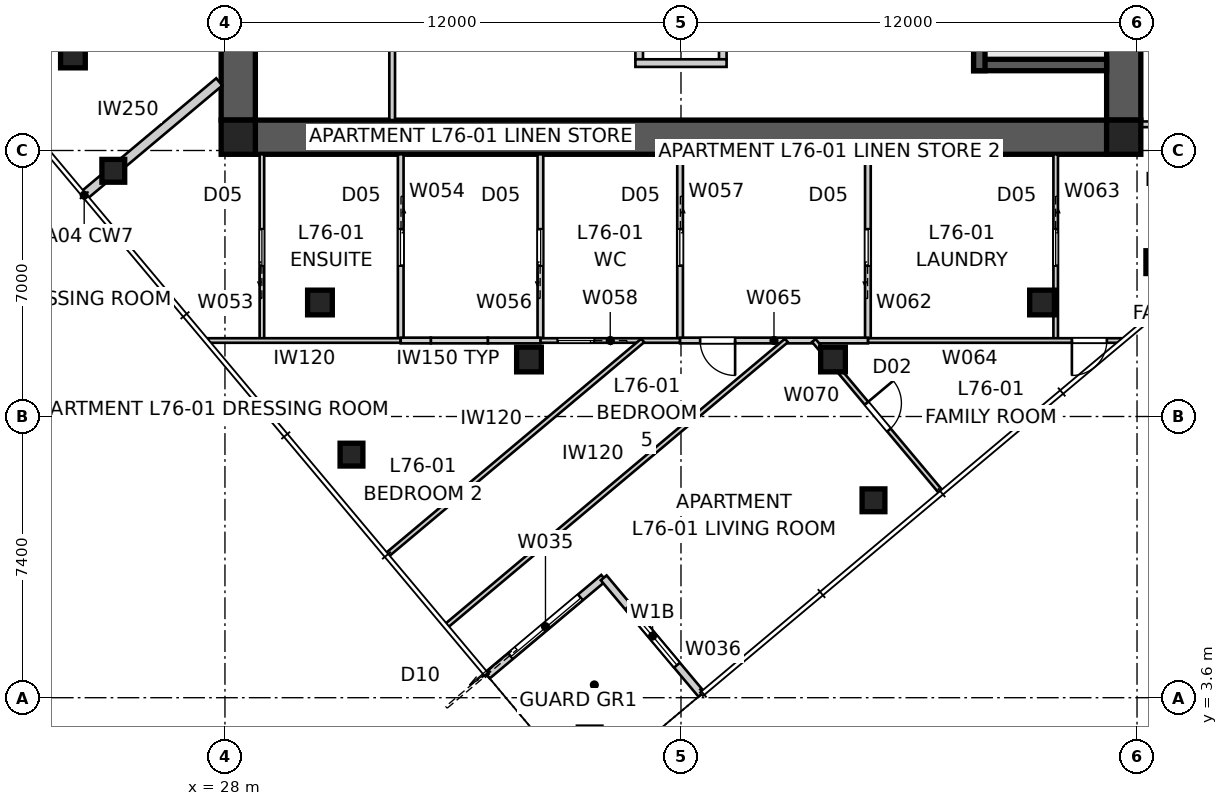
"""IFC4 building model, lengths in metres.
Left out: names, types, materials, properties, quantities, classifications, styles, units other than length and angle.
Written with IfcOpenShell. Run it as: python <this file> out.ifc"""

import sys

from ifc_helpers import new_model, si_unit, direction, frame, frame_2d, origin, origin_2d, place, context, subcontext, project, spatial, polyline, rectangle, outline, extrude, element, fill, save


model = new_model("IFC4")
c1 = context("Model", 3, precision=1e-05, world=origin(), true_north=direction((0.0, 1.0)))
c2 = subcontext(c1, "Body", "Model", "MODEL_VIEW")
j1 = project(units=[si_unit("LENGTHUNIT", "METRE"), si_unit("PLANEANGLEUNIT", "RADIAN")], contexts=[c1])
p1 = place(None, origin())
s1 = spatial("IfcSite", under=j1, at=p1, CompositionType="ELEMENT")
p2 = place(p1, origin())
s2 = spatial("IfcBuilding", under=s1, at=p2, CompositionType="ELEMENT")
p3 = place(p2, frame((0.0, 0.0, 276.0)))
s3 = spatial("IfcBuildingStorey", under=s2, at=p3, CompositionType="ELEMENT", Elevation=276.0)
p4 = place(p3, frame((51.2, 18.35, 0.0), z_axis=(0.0, 0.0, 1.0), x_axis=(-1.0, 0.0, 0.0)))
e1 = element("IfcWall", 1, at=p4, inside=s3, PredefinedType="SHEAR", context=c2, shape_type="SweptSolid", body=[
    extrude(outline(polyline([(0.0, -0.45), (22.4, -0.45), (22.4, -0.025), (22.85, -0.025), (22.85, 0.025), (22.4, 0.025), (22.4, 0.45), (0.0, 0.45), (0.0, 0.025), (-0.45, 0.025), (-0.45, -0.025), (0.0, -0.025), (0.0, -0.45)])), origin(), (0.0, 0.0, 1.0), 3.4),
])
p5 = place(p3, frame((51.65, 18.8, 0.0), z_axis=(0.0, 0.0, 1.0), x_axis=(0.0, 1.0, 0.0)))
e2 = element("IfcWall", 2, at=p5, inside=s3, PredefinedType="SHEAR", context=c2, shape_type="SweptSolid", body=[
    extrude(outline(polyline([(0.0, -0.45), (22.4, -0.45), (22.4, -0.025), (22.85, -0.025), (22.85, 0.025), (22.4, 0.025), (22.4, 0.45), (0.0, 0.45), (0.0, 0.025), (-0.45, 0.025), (-0.45, -0.025), (0.0, -0.025), (0.0, -0.45)])), origin(), (0.0, 0.0, 1.0), 3.4),
])
p6 = place(p5, frame((11.14, 0.0, 0.0)))
e3 = element("IfcOpeningElement", 3, at=p6, cuts=e2, PredefinedType="OPENING", context=c2, shape_type="SweptSolid", body=[
    extrude(rectangle(XDim=1.02, YDim=2.4, at=frame_2d((0.51, 1.2))), frame((0.0, 0.46, 0.0), z_axis=(0.0, -1.0, 0.0), x_axis=(1.0, 0.0, 0.0)), (0.0, 0.0, 1.0), 0.92),
])
p7 = place(p3, frame((28.35, 41.2, 0.0), z_axis=(0.0, 0.0, 1.0), x_axis=(0.0, -1.0, 0.0)))
e4 = element("IfcWall", 4, at=p7, inside=s3, PredefinedType="SHEAR", context=c2, shape_type="SweptSolid", body=[
    extrude(outline(polyline([(0.0, -0.45), (22.4, -0.45), (22.4, -0.025), (22.85, -0.025), (22.85, 0.025), (22.4, 0.025), (22.4, 0.45), (0.0, 0.45), (0.0, 0.025), (-0.45, 0.025), (-0.45, -0.025), (0.0, -0.025), (0.0, -0.45)])), origin(), (0.0, 0.0, 1.0), 3.4),
])
p8 = place(p7, frame((11.14, 0.0, 0.0)))
e5 = element("IfcOpeningElement", 5, at=p8, cuts=e4, PredefinedType="OPENING", context=c2, shape_type="SweptSolid", body=[
    extrude(rectangle(XDim=1.02, YDim=2.4, at=frame_2d((0.51, 1.2))), frame((0.0, 0.46, 0.0), z_axis=(0.0, -1.0, 0.0), x_axis=(1.0, 0.0, 0.0)), (0.0, 0.0, 1.0), 0.92),
])
p9 = place(p3, frame((47.85, 27.8, 0.0), z_axis=(0.0, 0.0, 1.0), x_axis=(0.0, -1.0, 0.0)))
e6 = element("IfcWall", 6, at=p9, inside=s3, PredefinedType="SHEAR", context=c2, shape_type="SweptSolid", body=[
    extrude(rectangle(XDim=7.7, YDim=0.3, at=frame_2d((3.85, 0.0))), origin(), (0.0, 0.0, 1.0), 3.4),
])
p10 = place(p3, frame((51.2, 20.25, 0.0), z_axis=(0.0, 0.0, 1.0), x_axis=(-1.0, 0.0, 0.0)))
e7 = element("IfcWall", 7, at=p10, inside=s3, PredefinedType="SHEAR", context=c2, shape_type="SweptSolid", body=[
    extrude(rectangle(XDim=3.5, YDim=0.3, at=frame_2d((1.75, 0.0))), origin(), (0.0, 0.0, 1.0), 3.4),
])
for number, where, z_axis, x_axis in (
    (8, (38.9, 22.4, 0.0), (0.0, 0.0, 1.0), (0.0, -1.0, 0.0)),
    (9, (41.1, 22.4, 0.0), (0.0, 0.0, 1.0), (0.0, -1.0, 0.0)),
):
    element("IfcWall", number, at=place(p3, frame(where, z_axis=z_axis, x_axis=x_axis)), inside=s3, PredefinedType="SOLIDWALL", context=c2, shape_type="SweptSolid", body=[
        extrude(rectangle(XDim=2.0, YDim=0.2, at=frame_2d((1.0, 0.0))), origin(), (0.0, 0.0, 1.0), 3.4),
    ])
p11 = place(p3, frame((38.8, 20.3, 0.0), z_axis=(0.0, 0.0, 1.0), x_axis=(1.0, 0.0, 0.0)))
e10 = element("IfcWall", 10, at=p11, inside=s3, PredefinedType="SOLIDWALL", context=c2, shape_type="SweptSolid", body=[
    extrude(rectangle(XDim=2.4, YDim=0.2, at=frame_2d((1.2, 0.0))), origin(), (0.0, 0.0, 1.0), 3.4),
])
for number, where, z_axis, x_axis in (
    (11, (28.35, 18.35, 0.0), (0.0, 0.0, 1.0), (1.0, 0.0, 0.0)),
    (12, (51.65, 18.35, 0.0), (0.0, 0.0, 1.0), (1.0, 0.0, 0.0)),
):
    element("IfcColumn", number, at=place(p3, frame(where, z_axis=z_axis, x_axis=x_axis)), inside=s3, PredefinedType="COLUMN", context=c2, shape_type="SweptSolid", body=[
        extrude(rectangle(XDim=0.9, YDim=0.9, at=origin_2d()), origin(), (0.0, 0.0, 1.0), 3.4),
    ])
for number, where, z_axis, x_axis in (
    (13, (45.065, 8.795, 0.0), (0.0, 0.0, 1.0), (1.0, 0.0, 0.0)),
    (14, (52.534, 15.062, 0.0), (0.0, 0.0, 1.0), (1.0, 0.0, 0.0)),
    (15, (25.062, 17.466, 0.0), (0.0, 0.0, 1.0), (1.0, 0.0, 0.0)),
    (16, (31.329, 9.997, 0.0), (0.0, 0.0, 1.0), (1.0, 0.0, 0.0)),
):
    element("IfcColumn", number, at=place(p3, frame(where, z_axis=z_axis, x_axis=x_axis)), inside=s3, PredefinedType="COLUMN", context=c2, shape_type="SweptSolid", body=[
        extrude(rectangle(XDim=0.6, YDim=0.6, at=origin_2d()), origin(), (0.0, 0.0, 1.0), 3.4),
    ])
for number, where, z_axis, x_axis in (
    (17, (24.0, 20.5, 0.0), (0.0, 0.0, 1.0), (1.0, 0.0, 0.0)),
    (18, (30.5, 14.0, 0.0), (0.0, 0.0, 1.0), (1.0, 0.0, 0.0)),
    (19, (36.0, 12.5, 0.0), (0.0, 0.0, 1.0), (1.0, 0.0, 0.0)),
    (20, (44.0, 12.5, 0.0), (0.0, 0.0, 1.0), (1.0, 0.0, 0.0)),
    (21, (49.5, 14.0, 0.0), (0.0, 0.0, 1.0), (1.0, 0.0, 0.0)),
):
    element("IfcColumn", number, at=place(p3, frame(where, z_axis=z_axis, x_axis=x_axis)), inside=s3, PredefinedType="COLUMN", context=c2, shape_type="SweptSolid", body=[
        extrude(rectangle(XDim=0.65, YDim=0.65, at=origin_2d()), origin(), (0.0, 0.0, 1.0), 3.4),
    ])
p12 = place(p3, frame((34.902, 4.183, 0.0), z_axis=(0.0, 0.0, 1.0), x_axis=(0.766060656284, 0.642768287094, 0.0)))
e22 = element("IfcWall", 22, at=p12, inside=s3, PredefinedType="SOLIDWALL", context=c2, shape_type="SweptSolid", body=[
    extrude(rectangle(XDim=4.0, YDim=0.2, at=frame_2d((2.0, 0.0))), origin(), (0.0, 0.0, 1.0), 3.25),
])
p13 = place(p12, frame((0.8, 0.0, 0.0)))
e23 = element("IfcOpeningElement", 23, at=p13, cuts=e22, PredefinedType="OPENING", context=c2, shape_type="SweptSolid", body=[
    extrude(rectangle(XDim=2.4, YDim=2.4, at=frame_2d((1.2, 1.2))), frame((0.0, 0.11, 0.0), z_axis=(0.0, -1.0, 0.0), x_axis=(1.0, 0.0, 0.0)), (0.0, 0.0, 1.0), 0.22),
])
p14 = place(p3, frame((37.966, 6.754, 0.0), z_axis=(0.0, 0.0, 1.0), x_axis=(0.642798342015, -0.766035437498, 0.0)))
e24 = element("IfcWall", 24, at=p14, inside=s3, PredefinedType="SOLIDWALL", context=c2, shape_type="SweptSolid", body=[
    extrude(rectangle(XDim=4.0, YDim=0.2, at=frame_2d((2.0, 0.0))), origin(), (0.0, 0.0, 1.0), 3.25),
])
p15 = place(p14, frame((1.0, 0.0, 0.45)))
e25 = element("IfcOpeningElement", 25, at=p15, cuts=e24, PredefinedType="OPENING", context=c2, shape_type="SweptSolid", body=[
    extrude(rectangle(XDim=2.0, YDim=1.8, at=frame_2d((1.0, 0.9))), frame((0.0, 0.11, 0.0), z_axis=(0.0, -1.0, 0.0), x_axis=(1.0, 0.0, 0.0)), (0.0, 0.0, 1.0), 0.22),
])
p16 = place(p3, frame((24.296, 16.823, 0.0), z_axis=(0.0, 0.0, 1.0), x_axis=(0.76603440109, 0.64279957712, 0.0)))
e26 = element("IfcWall", 26, at=p16, inside=s3, PredefinedType="PARTITIONING", context=c2, shape_type="SweptSolid", body=[
    extrude(rectangle(XDim=4.64, YDim=0.25, at=frame_2d((2.32, 0.0))), origin(), (0.0, 0.0, 1.0), 3.25),
])
p17 = place(p3, frame((32.4, 18.8, 0.0), z_axis=(0.0, 0.0, 1.0), x_axis=(0.0, 1.0, 0.0)))
e27 = element("IfcWall", 27, at=p17, inside=s3, PredefinedType="SOLIDWALL", context=c2, shape_type="SweptSolid", body=[
    extrude(rectangle(XDim=5.9, YDim=0.15, at=frame_2d((2.95, 0.0))), origin(), (0.0, 0.0, 1.0), 3.25),
])
p18 = place(p3, frame((28.972, 13.0, 0.0), z_axis=(0.0, 0.0, 1.0), x_axis=(0.0, 1.0, 0.0)))
e28 = element("IfcWall", 28, at=p18, inside=s3, PredefinedType="PARTITIONING", context=c2, shape_type="SweptSolid", body=[
    extrude(rectangle(XDim=4.9, YDim=0.12, at=frame_2d((2.45, 0.0))), origin(), (0.0, 0.0, 1.0), 3.25),
])
p19 = place(p18, frame((1.97, 0.0, 0.0)))
e29 = element("IfcOpeningElement", 29, at=p19, cuts=e28, PredefinedType="OPENING", context=c2, shape_type="SweptSolid", body=[
    extrude(rectangle(XDim=0.96, YDim=2.1, at=frame_2d((0.48, 1.05))), frame((0.0, 0.07, 0.0), z_axis=(0.0, -1.0, 0.0), x_axis=(1.0, 0.0, 0.0)), (0.0, 0.0, 1.0), 0.14),
])
p20 = place(p3, frame((32.625, 17.9, 0.0), z_axis=(0.0, 0.0, 1.0), x_axis=(0.0, -1.0, 0.0)))
e30 = element("IfcWall", 30, at=p20, inside=s3, PredefinedType="SOLIDWALL", context=c2, shape_type="SweptSolid", body=[
    extrude(rectangle(XDim=4.9, YDim=0.15, at=frame_2d((2.45, 0.0))), origin(), (0.0, 0.0, 1.0), 3.25),
])
p21 = place(p20, frame((1.97, 0.0, 0.0)))
e31 = element("IfcOpeningElement", 31, at=p21, cuts=e30, PredefinedType="OPENING", context=c2, shape_type="SweptSolid", body=[
    extrude(rectangle(XDim=0.96, YDim=2.1, at=frame_2d((0.48, 1.05))), frame((0.0, 0.085, 0.0), z_axis=(0.0, -1.0, 0.0), x_axis=(1.0, 0.0, 0.0)), (0.0, 0.0, 1.0), 0.17),
])
p22 = place(p3, frame((32.625, 13.0, 0.0), z_axis=(0.0, 0.0, 1.0), x_axis=(-1.0, 0.0, 0.0)))
e32 = element("IfcWall", 32, at=p22, inside=s3, PredefinedType="PARTITIONING", context=c2, shape_type="SweptSolid", body=[
    extrude(rectangle(XDim=5.069, YDim=0.12, at=frame_2d((2.534, 0.0))), origin(), (0.0, 0.0, 1.0), 3.25),
])
p23 = place(p3, frame((36.301, 13.0, 0.0), z_axis=(0.0, 0.0, 1.0), x_axis=(0.0, 1.0, 0.0)))
e33 = element("IfcWall", 33, at=p23, inside=s3, PredefinedType="SOLIDWALL", context=c2, shape_type="SweptSolid", body=[
    extrude(rectangle(XDim=4.9, YDim=0.15, at=frame_2d((2.45, 0.0))), origin(), (0.0, 0.0, 1.0), 3.25),
])
p24 = place(p23, frame((1.97, 0.0, 0.0)))
e34 = element("IfcOpeningElement", 34, at=p24, cuts=e33, PredefinedType="OPENING", context=c2, shape_type="SweptSolid", body=[
    extrude(rectangle(XDim=0.96, YDim=2.1, at=frame_2d((0.48, 1.05))), frame((0.0, 0.085, 0.0), z_axis=(0.0, -1.0, 0.0), x_axis=(1.0, 0.0, 0.0)), (0.0, 0.0, 1.0), 0.17),
])
p25 = place(p3, frame((39.976, 17.9, 0.0), z_axis=(0.0, 0.0, 1.0), x_axis=(0.0, -1.0, 0.0)))
e35 = element("IfcWall", 35, at=p25, inside=s3, PredefinedType="SOLIDWALL", context=c2, shape_type="SweptSolid", body=[
    extrude(rectangle(XDim=4.9, YDim=0.15, at=frame_2d((2.45, 0.0))), origin(), (0.0, 0.0, 1.0), 2.796),
])
p26 = place(p25, frame((1.97, 0.0, 0.0)))
e36 = element("IfcOpeningElement", 36, at=p26, cuts=e35, PredefinedType="OPENING", context=c2, shape_type="SweptSolid", body=[
    extrude(rectangle(XDim=0.96, YDim=2.1, at=frame_2d((0.48, 1.05))), frame((0.0, 0.085, 0.0), z_axis=(0.0, -1.0, 0.0), x_axis=(1.0, 0.0, 0.0)), (0.0, 0.0, 1.0), 0.17),
])
p27 = place(p3, frame((39.976, 13.0, 0.0), z_axis=(0.0, 0.0, 1.0), x_axis=(-1.0, 0.0, 0.0)))
e37 = element("IfcWall", 37, at=p27, inside=s3, PredefinedType="PARTITIONING", context=c2, shape_type="SweptSolid", body=[
    extrude(rectangle(XDim=3.676, YDim=0.12, at=frame_2d((1.838, 0.0))), origin(), (0.0, 0.0, 1.0), 3.25),
])
p28 = place(p27, frame((2.261, 0.0, 0.0)))
e38 = element("IfcOpeningElement", 38, at=p28, cuts=e37, PredefinedType="OPENING", context=c2, shape_type="SweptSolid", body=[
    extrude(rectangle(XDim=0.96, YDim=2.1, at=frame_2d((0.48, 1.05))), frame((0.0, 0.07, 0.0), z_axis=(0.0, -1.0, 0.0), x_axis=(1.0, 0.0, 0.0)), (0.0, 0.0, 1.0), 0.14),
])
p29 = place(p3, frame((36.301, 13.0, 0.0), z_axis=(0.0, 0.0, 1.0), x_axis=(-1.0, 0.0, 0.0)))
e39 = element("IfcWall", 39, at=p29, inside=s3, PredefinedType="SOLIDWALL", context=c2, shape_type="SweptSolid", body=[
    extrude(rectangle(XDim=1.384, YDim=0.15, at=frame_2d((0.692, 0.0))), origin(), (0.0, 0.0, 1.0), 3.25),
])
p30 = place(p3, frame((34.917, 13.0, 0.0), z_axis=(0.0, 0.0, 1.0), x_axis=(-1.0, 0.0, 0.0)))
e40 = element("IfcWall", 40, at=p30, inside=s3, PredefinedType="SOLIDWALL", context=c2, shape_type="SweptSolid", body=[
    extrude(rectangle(XDim=1.5, YDim=0.15, at=frame_2d((0.75, 0.0))), origin(), (0.0, 0.0, 1.0), 2.549),
])
p31 = place(p3, frame((33.417, 13.0, 0.0), z_axis=(0.0, 0.0, 1.0), x_axis=(-1.0, 0.0, 0.0)))
e41 = element("IfcWall", 41, at=p31, inside=s3, PredefinedType="SOLIDWALL", context=c2, shape_type="SweptSolid", body=[
    extrude(rectangle(XDim=0.792, YDim=0.15, at=frame_2d((0.396, 0.0))), origin(), (0.0, 0.0, 1.0), 3.25),
])
p32 = place(p3, frame((44.918, 13.0, 0.0), z_axis=(0.0, 0.0, 1.0), x_axis=(0.0, 1.0, 0.0)))
e42 = element("IfcWall", 42, at=p32, inside=s3, PredefinedType="SOLIDWALL", context=c2, shape_type="SweptSolid", body=[
    extrude(rectangle(XDim=4.9, YDim=0.15, at=frame_2d((2.45, 0.0))), origin(), (0.0, 0.0, 1.0), 3.25),
])
p33 = place(p32, frame((1.97, 0.0, 0.0)))
e43 = element("IfcOpeningElement", 43, at=p33, cuts=e42, PredefinedType="OPENING", context=c2, shape_type="SweptSolid", body=[
    extrude(rectangle(XDim=0.96, YDim=2.1, at=frame_2d((0.48, 1.05))), frame((0.0, 0.085, 0.0), z_axis=(0.0, -1.0, 0.0), x_axis=(1.0, 0.0, 0.0)), (0.0, 0.0, 1.0), 0.17),
])
p34 = place(p3, frame((49.86, 17.9, 0.0), z_axis=(0.0, 0.0, 1.0), x_axis=(0.0, -1.0, 0.0)))
e44 = element("IfcWall", 44, at=p34, inside=s3, PredefinedType="PARTITIONING", context=c2, shape_type="SweptSolid", body=[
    extrude(rectangle(XDim=4.9, YDim=0.12, at=frame_2d((2.45, 0.0))), origin(), (0.0, 0.0, 1.0), 3.25),
])
p35 = place(p34, frame((1.97, 0.0, 0.0)))
e45 = element("IfcOpeningElement", 45, at=p35, cuts=e44, PredefinedType="OPENING", context=c2, shape_type="SweptSolid", body=[
    extrude(rectangle(XDim=0.96, YDim=2.1, at=frame_2d((0.48, 1.05))), frame((0.0, 0.07, 0.0), z_axis=(0.0, -1.0, 0.0), x_axis=(1.0, 0.0, 0.0)), (0.0, 0.0, 1.0), 0.14),
])
p36 = place(p3, frame((51.57, 13.0, 0.0), z_axis=(0.0, 0.0, 1.0), x_axis=(-1.0, 0.0, 0.0)))
e46 = element("IfcWall", 46, at=p36, inside=s3, PredefinedType="PARTITIONING", context=c2, shape_type="SweptSolid", body=[
    extrude(rectangle(XDim=6.652, YDim=0.12, at=frame_2d((3.326, 0.0))), origin(), (0.0, 0.0, 1.0), 2.549),
])
p37 = place(p36, frame((0.364, 0.0, 0.0)))
e47 = element("IfcOpeningElement", 47, at=p37, cuts=e46, PredefinedType="OPENING", context=c2, shape_type="SweptSolid", body=[
    extrude(rectangle(XDim=0.92, YDim=2.34, at=frame_2d((0.46, 1.17))), frame((0.0, 0.07, 0.0), z_axis=(0.0, -1.0, 0.0), x_axis=(1.0, 0.0, 0.0)), (0.0, 0.0, 1.0), 0.14),
])
p38 = place(p3, frame((44.918, 13.0, 0.0), z_axis=(0.0, 0.0, 1.0), x_axis=(-1.0, 0.0, 0.0)))
e48 = element("IfcWall", 48, at=p38, inside=s3, PredefinedType="SOLIDWALL", context=c2, shape_type="SweptSolid", body=[
    extrude(rectangle(XDim=4.942, YDim=0.15, at=frame_2d((2.471, 0.0))), origin(), (0.0, 0.0, 1.0), 3.25),
])
p39 = place(p38, frame((3.494, 0.0, 0.0)))
e49 = element("IfcOpeningElement", 49, at=p39, cuts=e48, PredefinedType="OPENING", context=c2, shape_type="SweptSolid", body=[
    extrude(rectangle(XDim=0.92, YDim=2.34, at=frame_2d((0.46, 1.17))), frame((0.0, 0.085, 0.0), z_axis=(0.0, -1.0, 0.0), x_axis=(1.0, 0.0, 0.0)), (0.0, 0.0, 1.0), 0.17),
])
p40 = place(p3, frame((51.18, 18.689, 0.0), z_axis=(0.0, 0.0, 1.0), x_axis=(1.0, 0.0, 0.0)))
e50 = element("IfcWall", 50, at=p40, inside=s3, PredefinedType="SOLIDWALL", context=c2, shape_type="SweptSolid", body=[
    extrude(rectangle(XDim=5.82, YDim=0.15, at=frame_2d((2.91, 0.0))), origin(), (0.0, 0.0, 1.0), 3.25),
])
p41 = place(p40, frame((2.91, 0.0, 0.0)))
e51 = element("IfcOpeningElement", 51, at=p41, cuts=e50, PredefinedType="OPENING", context=c2, shape_type="SweptSolid", body=[
    extrude(rectangle(XDim=0.92, YDim=2.1, at=frame_2d((0.46, 1.05))), frame((0.0, 0.085, 0.0), z_axis=(0.0, -1.0, 0.0), x_axis=(1.0, 0.0, 0.0)), (0.0, 0.0, 1.0), 0.17),
])
p42 = place(p3, frame((33.844, 5.506, 0.0), z_axis=(0.0, 0.0, 1.0), x_axis=(0.766038517939, 0.642794670975, 0.0)))
e52 = element("IfcWall", 52, at=p42, inside=s3, PredefinedType="PARTITIONING", context=c2, shape_type="SweptSolid", body=[
    extrude(rectangle(XDim=11.658, YDim=0.12, at=frame_2d((5.829, 0.0))), origin(), (0.0, 0.0, 1.0), 3.25),
])
p43 = place(p3, frame((43.495, 13.0, 0.0), z_axis=(0.0, 0.0, 1.0), x_axis=(0.642776136034, -0.76605407051, 0.0)))
e53 = element("IfcWall", 53, at=p43, inside=s3, PredefinedType="PARTITIONING", context=c2, shape_type="SweptSolid", body=[
    extrude(rectangle(XDim=5.191, YDim=0.12, at=frame_2d((2.595, 0.0))), origin(), (0.0, 0.0, 1.0), 3.25),
])
p44 = place(p43, frame((2.155, 0.0, 0.0)))
e54 = element("IfcOpeningElement", 54, at=p44, cuts=e53, PredefinedType="OPENING", context=c2, shape_type="SweptSolid", body=[
    extrude(rectangle(XDim=0.92, YDim=2.34, at=frame_2d((0.46, 1.17))), frame((0.0, 0.07, 0.0), z_axis=(0.0, -1.0, 0.0), x_axis=(1.0, 0.0, 0.0)), (0.0, 0.0, 1.0), 0.14),
])
p45 = place(p3, frame((38.992, 13.0, 0.0), z_axis=(0.0, 0.0, 1.0), x_axis=(-0.766046785022, -0.642784818704, 0.0)))
e55 = element("IfcWall", 55, at=p45, inside=s3, PredefinedType="PARTITIONING", context=c2, shape_type="SweptSolid", body=[
    extrude(rectangle(XDim=8.76, YDim=0.12, at=frame_2d((4.38, 0.0))), origin(), (0.0, 0.0, 1.0), 3.25),
])
p46 = place(p13, origin())
e56 = element("IfcDoor", 56, at=p46, inside=s3, OperationType="SLIDING_TO_LEFT", PredefinedType="DOOR", context=c2, shape_type="SweptSolid", body=[
    extrude(rectangle(XDim=2.4, YDim=2.4, at=frame_2d((1.2, 1.2))), frame((0.0, 0.025, 0.0), z_axis=(0.0, -1.0, 0.0), x_axis=(1.0, 0.0, 0.0)), (0.0, 0.0, 1.0), 0.05),
])
fill(e23, e56)
p47 = place(p15, origin())
e57 = element("IfcWindow", 57, at=p47, inside=s3, PartitioningType="SINGLE_PANEL", PredefinedType="WINDOW", context=c2, shape_type="SweptSolid", body=[
    extrude(rectangle(XDim=2.0, YDim=1.8, at=frame_2d((1.0, 0.9))), frame((0.0, 0.03, 0.0), z_axis=(0.0, -1.0, 0.0), x_axis=(1.0, 0.0, 0.0)), (0.0, 0.0, 1.0), 0.06),
])
fill(e25, e57)
p48 = place(p35, origin())
e58 = element("IfcDoor", 58, at=p48, inside=s3, OperationType="SLIDING_TO_LEFT", PredefinedType="DOOR", context=c2, shape_type="SweptSolid", body=[
    extrude(rectangle(XDim=0.96, YDim=2.1, at=frame_2d((0.48, 1.05))), frame((0.0, 0.025, 0.0), z_axis=(0.0, -1.0, 0.0), x_axis=(1.0, 0.0, 0.0)), (0.0, 0.0, 1.0), 0.05),
])
fill(e45, e58)
p49 = place(p37, origin())
e59 = element("IfcDoor", 59, at=p49, inside=s3, OperationType="SINGLE_SWING_RIGHT", PredefinedType="DOOR", context=c2, shape_type="SweptSolid", body=[
    extrude(rectangle(XDim=0.92, YDim=2.34, at=frame_2d((0.46, 1.17))), frame((0.0, 0.025, 0.0), z_axis=(0.0, -1.0, 0.0), x_axis=(1.0, 0.0, 0.0)), (0.0, 0.0, 1.0), 0.05),
])
fill(e47, e59)
p50 = place(p33, origin())
e60 = element("IfcDoor", 60, at=p50, inside=s3, OperationType="SLIDING_TO_LEFT", PredefinedType="DOOR", context=c2, shape_type="SweptSolid", body=[
    extrude(rectangle(XDim=0.96, YDim=2.1, at=frame_2d((0.48, 1.05))), frame((0.0, 0.025, 0.0), z_axis=(0.0, -1.0, 0.0), x_axis=(1.0, 0.0, 0.0)), (0.0, 0.0, 1.0), 0.05),
])
fill(e43, e60)
p51 = place(p44, origin())
e61 = element("IfcDoor", 61, at=p51, inside=s3, OperationType="SINGLE_SWING_LEFT", PredefinedType="DOOR", context=c2, shape_type="SweptSolid", body=[
    extrude(rectangle(XDim=0.92, YDim=2.34, at=frame_2d((0.46, 1.17))), frame((0.0, 0.025, 0.0), z_axis=(0.0, -1.0, 0.0), x_axis=(1.0, 0.0, 0.0)), (0.0, 0.0, 1.0), 0.05),
])
fill(e54, e61)
p52 = place(p26, origin())
e62 = element("IfcDoor", 62, at=p52, inside=s3, OperationType="SLIDING_TO_LEFT", PredefinedType="DOOR", context=c2, shape_type="SweptSolid", body=[
    extrude(rectangle(XDim=0.96, YDim=2.1, at=frame_2d((0.48, 1.05))), frame((0.0, 0.025, 0.0), z_axis=(0.0, -1.0, 0.0), x_axis=(1.0, 0.0, 0.0)), (0.0, 0.0, 1.0), 0.05),
])
fill(e36, e62)
p53 = place(p39, origin())
e63 = element("IfcDoor", 63, at=p53, inside=s3, OperationType="SINGLE_SWING_LEFT", PredefinedType="DOOR", context=c2, shape_type="SweptSolid", body=[
    extrude(rectangle(XDim=0.92, YDim=2.34, at=frame_2d((0.46, 1.17))), frame((0.0, 0.025, 0.0), z_axis=(0.0, -1.0, 0.0), x_axis=(1.0, 0.0, 0.0)), (0.0, 0.0, 1.0), 0.05),
])
fill(e49, e63)
p54 = place(p24, origin())
e64 = element("IfcDoor", 64, at=p54, inside=s3, OperationType="SLIDING_TO_LEFT", PredefinedType="DOOR", context=c2, shape_type="SweptSolid", body=[
    extrude(rectangle(XDim=0.96, YDim=2.1, at=frame_2d((0.48, 1.05))), frame((0.0, 0.025, 0.0), z_axis=(0.0, -1.0, 0.0), x_axis=(1.0, 0.0, 0.0)), (0.0, 0.0, 1.0), 0.05),
])
fill(e34, e64)
p55 = place(p28, origin())
e65 = element("IfcDoor", 65, at=p55, inside=s3, OperationType="SLIDING_TO_LEFT", PredefinedType="DOOR", context=c2, shape_type="SweptSolid", body=[
    extrude(rectangle(XDim=0.96, YDim=2.1, at=frame_2d((0.48, 1.05))), frame((0.0, 0.025, 0.0), z_axis=(0.0, -1.0, 0.0), x_axis=(1.0, 0.0, 0.0)), (0.0, 0.0, 1.0), 0.05),
])
fill(e38, e65)
p56 = place(p21, origin())
e66 = element("IfcDoor", 66, at=p56, inside=s3, OperationType="SLIDING_TO_LEFT", PredefinedType="DOOR", context=c2, shape_type="SweptSolid", body=[
    extrude(rectangle(XDim=0.96, YDim=2.1, at=frame_2d((0.48, 1.05))), frame((0.0, 0.025, 0.0), z_axis=(0.0, -1.0, 0.0), x_axis=(1.0, 0.0, 0.0)), (0.0, 0.0, 1.0), 0.05),
])
fill(e31, e66)
p57 = place(p19, origin())
e67 = element("IfcDoor", 67, at=p57, inside=s3, OperationType="SLIDING_TO_LEFT", PredefinedType="DOOR", context=c2, shape_type="SweptSolid", body=[
    extrude(rectangle(XDim=0.96, YDim=2.1, at=frame_2d((0.48, 1.05))), frame((0.0, 0.025, 0.0), z_axis=(0.0, -1.0, 0.0), x_axis=(1.0, 0.0, 0.0)), (0.0, 0.0, 1.0), 0.05),
])
fill(e29, e67)
save(model, sys.argv[1])
